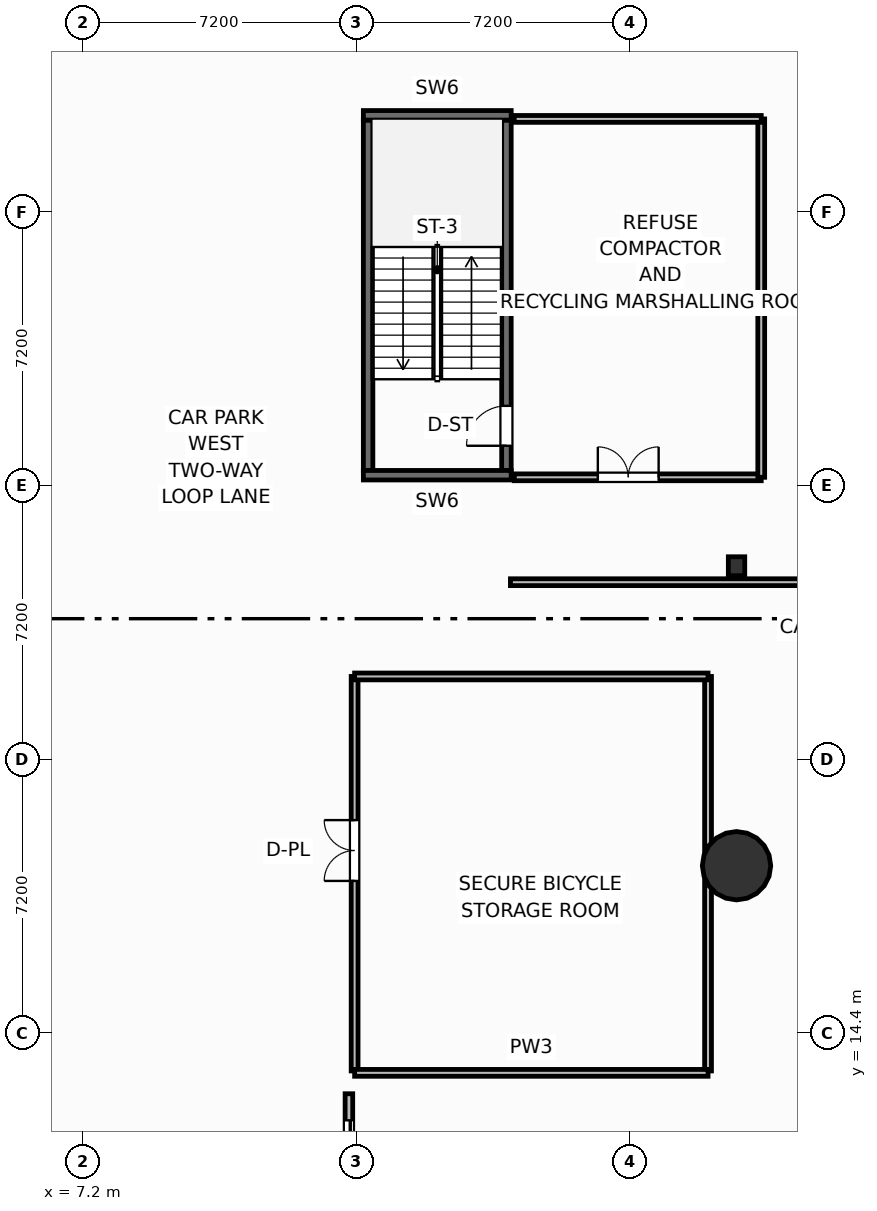
"""IFC4 building model, lengths in metres.
Left out: names, types, materials, properties, quantities, classifications, styles, units other than length and angle.
Written with IfcOpenShell. Run it as: python <this file> out.ifc"""

import sys

from ifc_helpers import new_model, si_unit, direction, frame, frame_2d, origin, origin_2d, place, context, subcontext, project, spatial, rectangle, circle, i_section, extrude, element, fill, save


model = new_model("IFC4")
c1 = context("Model", 3, precision=1e-05, world=origin(), true_north=direction((0.0, 1.0)))
c2 = subcontext(c1, "Body", "Model", "MODEL_VIEW")
j1 = project(units=[si_unit("LENGTHUNIT", "METRE"), si_unit("PLANEANGLEUNIT", "RADIAN")], contexts=[c1])
p1 = place(None, origin())
s1 = spatial("IfcSite", under=j1, at=p1, CompositionType="ELEMENT")
p2 = place(p1, origin())
s2 = spatial("IfcBuilding", under=s1, at=p2, CompositionType="ELEMENT")
p3 = place(p2, frame((0.0, 0.0, -4.5)))
s3 = spatial("IfcBuildingStorey", under=s2, at=p3, CompositionType="ELEMENT", Elevation=-4.5)
p4 = place(p3, frame((24.4, 26.68, 0.0), z_axis=(0.0, 0.0, 1.0), x_axis=(1.0, 0.0, 0.0)))
e1 = element("IfcColumn", 1, at=p4, inside=s3, PredefinedType="COLUMN", context=c2, shape_type="SweptSolid", body=[
    extrude(i_section(OverallWidth=0.432, OverallDepth=0.498, WebThickness=0.056, FlangeThickness=0.089, FilletRadius=0.025, at=origin_2d()), origin(), (0.0, 0.0, 1.0), 4.5),
])
p5 = place(p3, frame((14.705, 29.2, 0.0), z_axis=(0.0, 0.0, 1.0), x_axis=(0.0, 1.0, 0.0)))
e2 = element("IfcWall", 2, at=p5, inside=s3, PredefinedType="SHEAR", context=c2, shape_type="SweptSolid", body=[
    extrude(rectangle(XDim=9.22, YDim=0.25, at=frame_2d((4.61, 0.0))), origin(), (0.0, 0.0, 1.0), 4.18),
])
p6 = place(p3, frame((18.345, 29.2, 0.0), z_axis=(0.0, 0.0, 1.0), x_axis=(0.0, 1.0, 0.0)))
e3 = element("IfcWall", 3, at=p6, inside=s3, PredefinedType="SHEAR", context=c2, shape_type="SweptSolid", body=[
    extrude(rectangle(XDim=9.22, YDim=0.25, at=frame_2d((4.61, 0.0))), origin(), (0.0, 0.0, 1.0), 4.18),
])
p7 = place(p6, frame((0.65, 0.0, 0.0)))
e4 = element("IfcOpeningElement", 4, at=p7, cuts=e3, PredefinedType="OPENING", context=c2, shape_type="SweptSolid", body=[
    extrude(rectangle(XDim=1.05, YDim=2.15, at=frame_2d((0.525, 1.075))), frame((0.0, 0.135, 0.0), z_axis=(0.0, -1.0, 0.0), x_axis=(1.0, 0.0, 0.0)), (0.0, 0.0, 1.0), 0.27),
])
for number, where, z_axis, x_axis in (
    (5, (14.58, 38.545, 0.0), (0.0, 0.0, 1.0), (1.0, 0.0, 0.0)),
    (6, (14.58, 29.075, 0.0), (0.0, 0.0, 1.0), (1.0, 0.0, 0.0)),
):
    element("IfcWall", number, at=place(p3, frame(where, z_axis=z_axis, x_axis=x_axis)), inside=s3, PredefinedType="SHEAR", context=c2, shape_type="SweptSolid", body=[
        extrude(rectangle(XDim=3.89, YDim=0.25, at=frame_2d((1.945, 0.0))), origin(), (0.0, 0.0, 1.0), 4.18),
    ])
p8 = place(p3, frame((24.4, 18.8, 0.0), z_axis=(0.0, 0.0, 1.0), x_axis=(1.0, 0.0, 0.0)))
e7 = element("IfcColumn", 7, at=p8, inside=s3, PredefinedType="COLUMN", context=c2, shape_type="SweptSolid", body=[
    extrude(circle(Radius=0.9, at=origin_2d()), origin(), (0.0, 0.0, 1.0), 4.5),
])
p9 = place(p3, frame((18.45, 26.26, 0.0), z_axis=(0.0, 0.0, 1.0), x_axis=(1.0, 0.0, 0.0)))
e8 = element("IfcWall", 8, at=p9, inside=s3, PredefinedType="PARTITIONING", context=c2, shape_type="SweptSolid", body=[
    extrude(rectangle(XDim=29.35, YDim=0.18, at=frame_2d((14.675, 0.0))), origin(), (0.0, 0.0, 1.0), 3.392),
])
p10 = place(p9, frame((9.5, 0.0, 0.0)))
e9 = element("IfcOpeningElement", 9, at=p10, cuts=e8, PredefinedType="OPENING", context=c2, shape_type="SweptSolid", body=[
    extrude(rectangle(XDim=1.1, YDim=2.15, at=frame_2d((0.55, 1.075))), frame((0.0, 0.1, 0.0), z_axis=(0.0, -1.0, 0.0), x_axis=(1.0, 0.0, 0.0)), (0.0, 0.0, 1.0), 0.2),
])
p11 = place(p9, frame((22.0, 0.0, 0.0)))
e10 = element("IfcOpeningElement", 10, at=p11, cuts=e8, PredefinedType="OPENING", context=c2, shape_type="SweptSolid", body=[
    extrude(rectangle(XDim=1.1, YDim=2.15, at=frame_2d((0.55, 1.075))), frame((0.0, 0.1, 0.0), z_axis=(0.0, -1.0, 0.0), x_axis=(1.0, 0.0, 0.0)), (0.0, 0.0, 1.0), 0.2),
])
p12 = place(p3, frame((14.2, 6.2, 0.0), z_axis=(0.0, 0.0, 1.0), x_axis=(0.0, 1.0, 0.0)))
e11 = element("IfcWall", 11, at=p12, inside=s3, PredefinedType="PARTITIONING", context=c2, shape_type="SweptSolid", body=[
    extrude(rectangle(XDim=6.6, YDim=0.2, at=frame_2d((3.3, 0.0))), origin(), (0.0, 0.0, 1.0), 4.18),
])
p13 = place(p12, frame((0.7, 0.0, 0.0)))
e12 = element("IfcOpeningElement", 12, at=p13, cuts=e11, PredefinedType="OPENING", context=c2, shape_type="SweptSolid", body=[
    extrude(rectangle(XDim=5.2, YDim=2.8, at=frame_2d((2.6, 1.4))), frame((0.0, 0.11, 0.0), z_axis=(0.0, -1.0, 0.0), x_axis=(1.0, 0.0, 0.0)), (0.0, 0.0, 1.0), 0.22),
])
p14 = place(p3, frame((14.35, 13.4, 0.0), z_axis=(0.0, 0.0, 1.0), x_axis=(0.0, 1.0, 0.0)))
e13 = element("IfcWall", 13, at=p14, inside=s3, PredefinedType="PARTITIONING", context=c2, shape_type="SweptSolid", body=[
    extrude(rectangle(XDim=10.38, YDim=0.18, at=frame_2d((5.19, 0.0))), origin(), (0.0, 0.0, 1.0), 4.18),
])
p15 = place(p14, frame((5.0, 0.0, 0.0)))
e14 = element("IfcOpeningElement", 14, at=p15, cuts=e13, PredefinedType="OPENING", context=c2, shape_type="SweptSolid", body=[
    extrude(rectangle(XDim=1.6, YDim=2.05, at=frame_2d((0.8, 1.025))), frame((0.0, 0.1, 0.0), z_axis=(0.0, -1.0, 0.0), x_axis=(1.0, 0.0, 0.0)), (0.0, 0.0, 1.0), 0.2),
])
p16 = place(p3, frame((23.65, 13.4, 0.0), z_axis=(0.0, 0.0, 1.0), x_axis=(0.0, 1.0, 0.0)))
e15 = element("IfcWall", 15, at=p16, inside=s3, PredefinedType="PARTITIONING", context=c2, shape_type="SweptSolid", body=[
    extrude(rectangle(XDim=10.38, YDim=0.18, at=frame_2d((5.19, 0.0))), origin(), (0.0, 0.0, 1.0), 4.18),
])
for number, where, z_axis, x_axis in (
    (16, (14.35, 13.35, 0.0), (0.0, 0.0, 1.0), (1.0, 0.0, 0.0)),
    (17, (14.35, 23.78, 0.0), (0.0, 0.0, 1.0), (1.0, 0.0, 0.0)),
):
    element("IfcWall", number, at=place(p3, frame(where, z_axis=z_axis, x_axis=x_axis)), inside=s3, PredefinedType="PARTITIONING", context=c2, shape_type="SweptSolid", body=[
        extrude(rectangle(XDim=9.3, YDim=0.18, at=frame_2d((4.65, 0.0))), origin(), (0.0, 0.0, 1.0), 4.18),
    ])
p17 = place(p3, frame((18.55, 29.02, 0.0), z_axis=(0.0, 0.0, 1.0), x_axis=(1.0, 0.0, 0.0)))
e18 = element("IfcWall", 18, at=p17, inside=s3, PredefinedType="PARTITIONING", context=c2, shape_type="SweptSolid", body=[
    extrude(rectangle(XDim=6.5, YDim=0.18, at=frame_2d((3.25, 0.0))), origin(), (0.0, 0.0, 1.0), 4.18),
])
p18 = place(p17, frame((2.2, 0.0, 0.0)))
e19 = element("IfcOpeningElement", 19, at=p18, cuts=e18, PredefinedType="OPENING", context=c2, shape_type="SweptSolid", body=[
    extrude(rectangle(XDim=1.6, YDim=2.05, at=frame_2d((0.8, 1.025))), frame((0.0, 0.1, 0.0), z_axis=(0.0, -1.0, 0.0), x_axis=(1.0, 0.0, 0.0)), (0.0, 0.0, 1.0), 0.2),
])
p19 = place(p3, frame((25.05, 29.02, 0.0), z_axis=(0.0, 0.0, 1.0), x_axis=(0.0, 1.0, 0.0)))
e20 = element("IfcWall", 20, at=p19, inside=s3, PredefinedType="PARTITIONING", context=c2, shape_type="SweptSolid", body=[
    extrude(rectangle(XDim=9.43, YDim=0.18, at=frame_2d((4.715, 0.0))), origin(), (0.0, 0.0, 1.0), 4.18),
])
p20 = place(p3, frame((18.55, 38.45, 0.0), z_axis=(0.0, 0.0, 1.0), x_axis=(1.0, 0.0, 0.0)))
e21 = element("IfcWall", 21, at=p20, inside=s3, PredefinedType="PARTITIONING", context=c2, shape_type="SweptSolid", body=[
    extrude(rectangle(XDim=6.5, YDim=0.18, at=frame_2d((3.25, 0.0))), origin(), (0.0, 0.0, 1.0), 4.18),
])
p21 = place(p13, origin())
e22 = element("IfcDoor", 22, at=p21, inside=s3, OperationType="SLIDING_TO_LEFT", PredefinedType="GATE", context=c2, shape_type="SweptSolid", body=[
    extrude(rectangle(XDim=5.2, YDim=2.8, at=frame_2d((2.6, 1.4))), frame((0.0, 0.025, 0.0), z_axis=(0.0, -1.0, 0.0), x_axis=(1.0, 0.0, 0.0)), (0.0, 0.0, 1.0), 0.05),
])
fill(e12, e22)
p22 = place(p15, origin())
e23 = element("IfcDoor", 23, at=p22, inside=s3, OperationType="DOUBLE_DOOR_SINGLE_SWING", PredefinedType="DOOR", context=c2, shape_type="SweptSolid", body=[
    extrude(rectangle(XDim=1.6, YDim=2.05, at=frame_2d((0.8, 1.025))), frame((0.0, 0.025, 0.0), z_axis=(0.0, -1.0, 0.0), x_axis=(1.0, 0.0, 0.0)), (0.0, 0.0, 1.0), 0.05),
])
fill(e14, e23)
p23 = place(p18, origin())
e24 = element("IfcDoor", 24, at=p23, inside=s3, OperationType="DOUBLE_DOOR_SINGLE_SWING", PredefinedType="DOOR", context=c2, shape_type="SweptSolid", body=[
    extrude(rectangle(XDim=1.6, YDim=2.05, at=frame_2d((0.8, 1.025))), frame((0.0, 0.025, 0.0), z_axis=(0.0, -1.0, 0.0), x_axis=(1.0, 0.0, 0.0)), (0.0, 0.0, 1.0), 0.05),
])
fill(e19, e24)
p24 = place(p7, origin())
e25 = element("IfcDoor", 25, at=p24, inside=s3, OperationType="SINGLE_SWING_LEFT", PredefinedType="DOOR", context=c2, shape_type="SweptSolid", body=[
    extrude(rectangle(XDim=1.05, YDim=2.15, at=frame_2d((0.525, 1.075))), frame((0.0, 0.025, 0.0), z_axis=(0.0, -1.0, 0.0), x_axis=(1.0, 0.0, 0.0)), (0.0, 0.0, 1.0), 0.05),
])
fill(e4, e25)
save(model, sys.argv[1])
